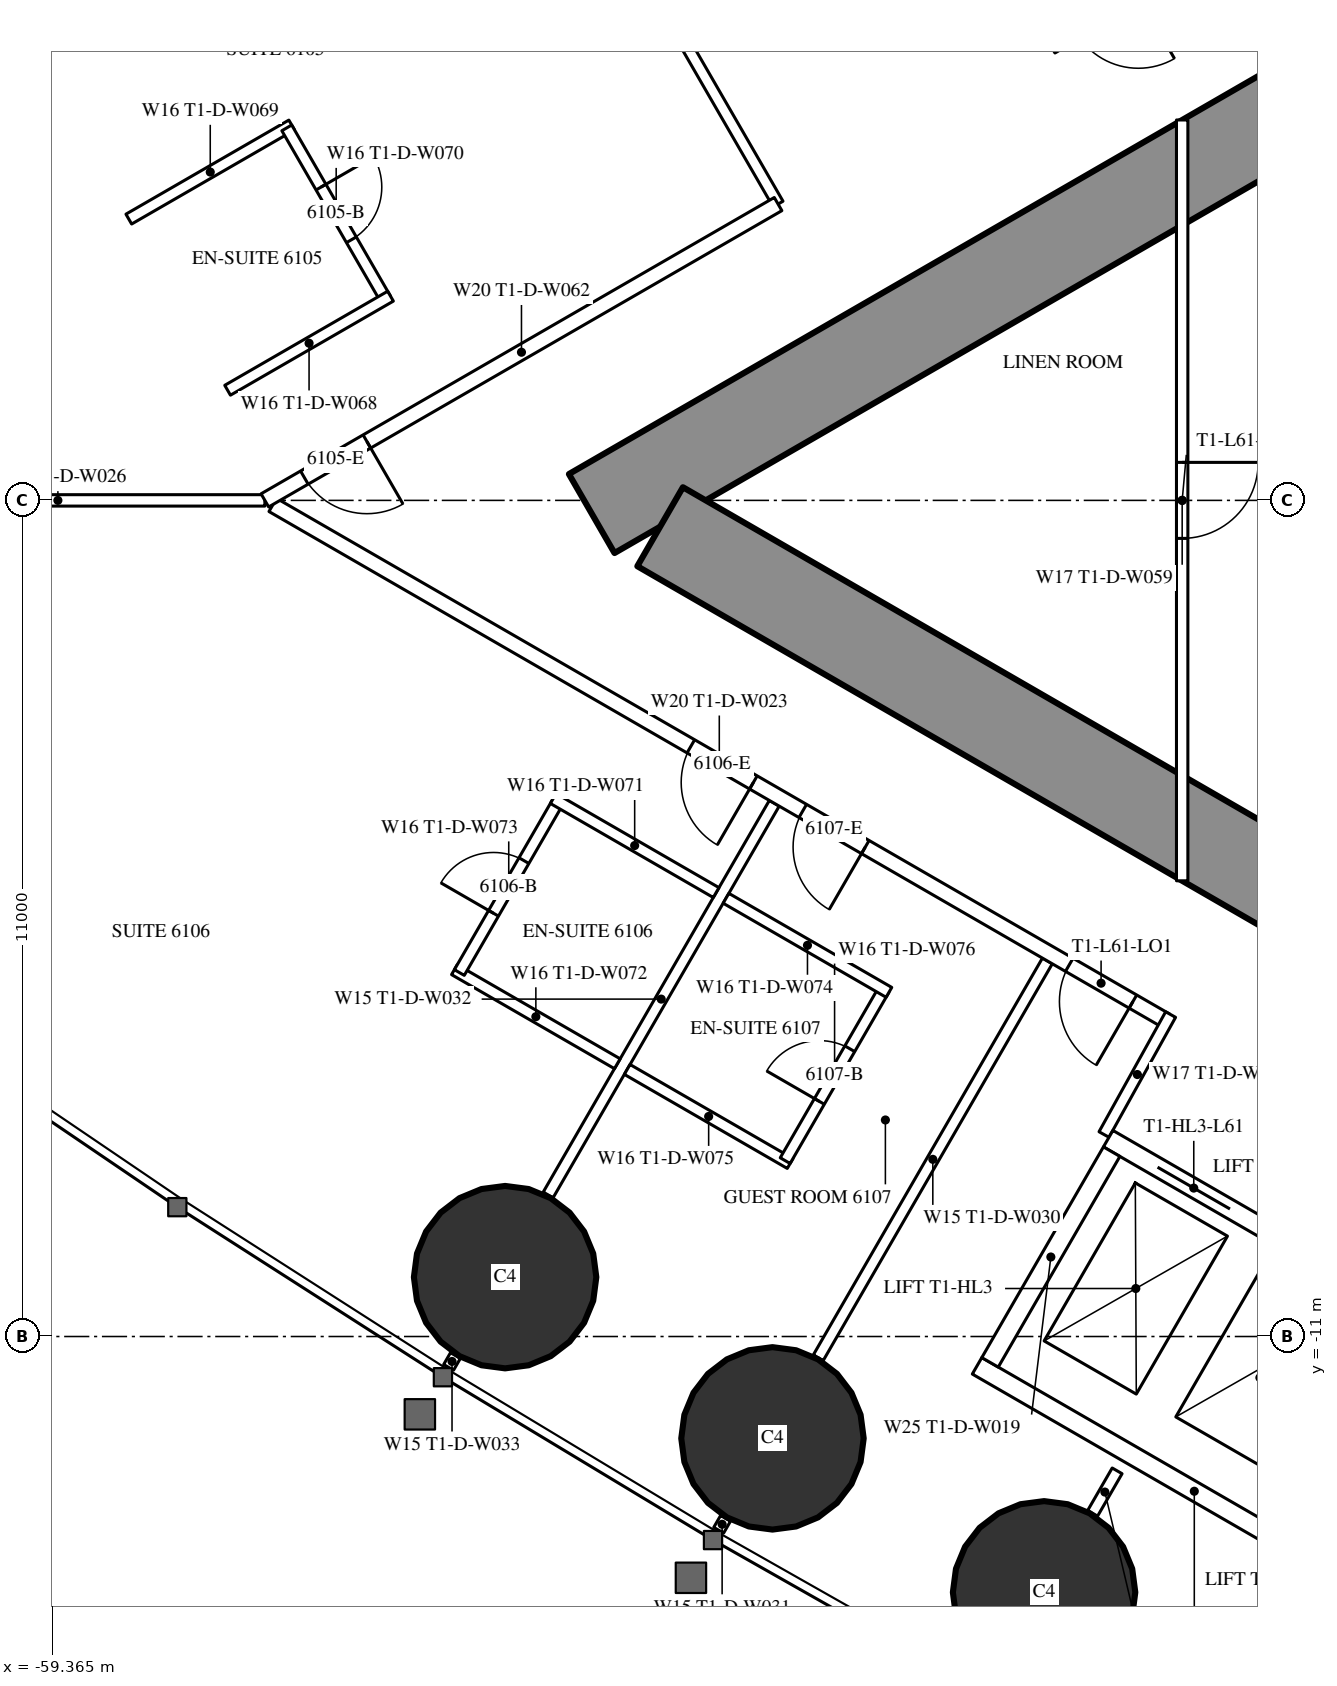
"""IFC4 building model, lengths in metres.
Left out: names, types, materials, properties, quantities, classifications, styles, units other than length and angle.
Written with IfcOpenShell. Run it as: python <this file> out.ifc"""

import sys

from ifc_helpers import new_model, si_unit, direction, frame, frame_2d, origin, origin_2d, place, context, subcontext, project, spatial, rectangle, circle, extrude, element, fill, save


model = new_model("IFC4")
c1 = context("Model", 3, precision=1e-05, world=origin(), true_north=direction((0.0, 1.0)))
c2 = subcontext(c1, "Body", "Model", "MODEL_VIEW")
j1 = project(units=[si_unit("LENGTHUNIT", "METRE"), si_unit("PLANEANGLEUNIT", "RADIAN")], contexts=[c1])
p1 = place(None, origin())
s1 = spatial("IfcSite", under=j1, at=p1, CompositionType="ELEMENT")
p2 = place(p1, origin())
s2 = spatial("IfcBuilding", under=s1, at=p2, CompositionType="ELEMENT")
p3 = place(p2, frame((0.0, 0.0, 229.7)))
s3 = spatial("IfcBuildingStorey", under=s2, at=p3, CompositionType="ELEMENT", Elevation=229.7)
for number, where, z_axis, x_axis in (
    (1, (-53.408, -10.219, 0.0), (0.0, 0.0, 1.0), (1.0, 0.0, 0.0)),
    (2, (-49.89, -12.34, 0.0), (0.0, 0.0, 1.0), (1.0, 0.0, 0.0)),
    (3, (-46.317, -14.365, 0.0), (0.0, 0.0, 1.0), (1.0, 0.0, 0.0)),
):
    element("IfcColumn", number, at=place(p3, frame(where, z_axis=z_axis, x_axis=x_axis)), inside=s3, PredefinedType="COLUMN", context=c2, shape_type="SweptSolid", body=[
        extrude(circle(Radius=1.2, at=origin_2d()), origin(), (0.0, 0.0, 1.0), 3.6),
    ])
p4 = place(p3, frame((-27.2, 14.3, 0.0), z_axis=(0.0, 0.0, 1.0), x_axis=(-0.866026593062, -0.499997940104, 0.0)))
e4 = element("IfcWall", 4, at=p4, inside=s3, PredefinedType="SHEAR", context=c2, shape_type="SweptSolid", body=[
    extrude(rectangle(XDim=28.946, YDim=1.2, at=frame_2d((14.473, 0.0))), origin(), (0.0, 0.0, 1.0), 3.6),
])
p5 = place(p4, frame((4.6, 0.0, 0.0)))
e5 = element("IfcOpeningElement", 5, at=p5, cuts=e4, PredefinedType="OPENING", context=c2, shape_type="SweptSolid", body=[
    extrude(rectangle(XDim=1.0, YDim=2.2, at=frame_2d((0.5, 1.1))), frame((0.0, 0.61, 0.0), z_axis=(0.0, -1.0, 0.0), x_axis=(1.0, 0.0, 0.0)), (0.0, 0.0, 1.0), 1.22),
])
p6 = place(p4, frame((13.395, 0.0, 0.0)))
e6 = element("IfcOpeningElement", 6, at=p6, cuts=e4, PredefinedType="OPENING", context=c2, shape_type="SweptSolid", body=[
    extrude(rectangle(XDim=1.8, YDim=2.2, at=frame_2d((0.9, 1.1))), frame((0.0, 0.61, 0.0), z_axis=(0.0, -1.0, 0.0), x_axis=(1.0, 0.0, 0.0)), (0.0, 0.0, 1.0), 1.22),
])
p7 = place(p3, frame((-27.2, -14.3, 0.0), z_axis=(0.0, 0.0, 1.0), x_axis=(-0.866024021859, 0.500002393557, 0.0)))
e7 = element("IfcWall", 7, at=p7, inside=s3, PredefinedType="SHEAR", context=c2, shape_type="SweptSolid", body=[
    extrude(rectangle(XDim=27.907, YDim=1.2, at=frame_2d((13.954, 0.0))), origin(), (0.0, 0.0, 1.0), 3.6),
])
p8 = place(p7, frame((4.6, 0.0, 0.0)))
e8 = element("IfcOpeningElement", 8, at=p8, cuts=e7, PredefinedType="OPENING", context=c2, shape_type="SweptSolid", body=[
    extrude(rectangle(XDim=1.0, YDim=2.2, at=frame_2d((0.5, 1.1))), frame((0.0, 0.61, 0.0), z_axis=(0.0, -1.0, 0.0), x_axis=(1.0, 0.0, 0.0)), (0.0, 0.0, 1.0), 1.22),
])
p9 = place(p7, frame((13.395, 0.0, 0.0)))
e9 = element("IfcOpeningElement", 9, at=p9, cuts=e7, PredefinedType="OPENING", context=c2, shape_type="SweptSolid", body=[
    extrude(rectangle(XDim=1.8, YDim=2.2, at=frame_2d((0.9, 1.1))), frame((0.0, 0.61, 0.0), z_axis=(0.0, -1.0, 0.0), x_axis=(1.0, 0.0, 0.0)), (0.0, 0.0, 1.0), 1.22),
])
p10 = place(p3, frame((-49.816, 3.898, 0.0), z_axis=(0.0, 0.0, 1.0), x_axis=(-0.500001913541, 0.866024298998, 0.0)))
e10 = element("IfcWall", 10, at=p10, inside=s3, PredefinedType="PARTITIONING", context=c2, shape_type="SweptSolid", body=[
    extrude(rectangle(XDim=6.05, YDim=0.15, at=frame_2d((3.025, 0.0))), origin(), (0.0, 0.0, 1.0), 2.45),
])
p11 = place(p3, frame((-46.274, -6.059, 0.0), z_axis=(0.0, 0.0, 1.0), x_axis=(-0.500020471368, -0.866013584312, 0.0)))
e11 = element("IfcWall", 11, at=p11, inside=s3, PredefinedType="PARTITIONING", context=c2, shape_type="SweptSolid", body=[
    extrude(rectangle(XDim=6.028, YDim=0.15, at=frame_2d((3.014, 0.0))), origin(), (0.0, 0.0, 1.0), 2.45),
])
p12 = place(p3, frame((-50.508, -13.392, 0.0), z_axis=(0.0, 0.0, 1.0), x_axis=(-0.499644091975, -0.866230789891, 0.0)))
e12 = element("IfcWall", 12, at=p12, inside=s3, PredefinedType="PARTITIONING", context=c2, shape_type="SweptSolid", body=[
    extrude(rectangle(XDim=0.18, YDim=0.15, at=frame_2d((0.09, 0.0))), origin(), (0.0, 0.0, 1.0), 2.45),
])
p13 = place(p3, frame((-49.866, -3.985, 0.0), z_axis=(0.0, 0.0, 1.0), x_axis=(-0.500000694566, -0.866025002776, 0.0)))
e13 = element("IfcWall", 13, at=p13, inside=s3, PredefinedType="PARTITIONING", context=c2, shape_type="SweptSolid", body=[
    extrude(rectangle(XDim=5.95, YDim=0.15, at=frame_2d((2.975, 0.0))), origin(), (0.0, 0.0, 1.0), 2.45),
])
p14 = place(p3, frame((-54.061, -11.25, 0.0), z_axis=(0.0, 0.0, 1.0), x_axis=(-0.500391173478, -0.865799441849, 0.0)))
e14 = element("IfcWall", 14, at=p14, inside=s3, PredefinedType="PARTITIONING", context=c2, shape_type="SweptSolid", body=[
    extrude(rectangle(XDim=0.179, YDim=0.15, at=frame_2d((0.089, 0.0))), origin(), (0.0, 0.0, 1.0), 2.45),
])
p15 = place(p3, frame((-56.568, 0.0, 0.0), z_axis=(0.0, 0.0, 1.0), x_axis=(-1.0, 0.0, 0.0)))
e15 = element("IfcWall", 15, at=p15, inside=s3, PredefinedType="PARTITIONING", context=c2, shape_type="SweptSolid", body=[
    extrude(rectangle(XDim=5.446, YDim=0.15, at=frame_2d((2.723, 0.0))), origin(), (0.0, 0.0, 1.0), 2.45),
])
p16 = place(p3, frame((-45.356, -12.767, 0.0), z_axis=(0.0, 0.0, 1.0), x_axis=(-0.499886366516, -0.866091000168, 0.0)))
e16 = element("IfcWall", 16, at=p16, inside=s3, PredefinedType="PARTITIONING", context=c2, shape_type="SweptSolid", body=[
    extrude(rectangle(XDim=0.645, YDim=0.15, at=frame_2d((0.322, 0.0))), origin(), (0.0, 0.0, 1.0), 3.35),
])
p17 = place(p3, frame((-44.715, -6.844, 0.0), z_axis=(0.0, 0.0, 1.0), x_axis=(-0.866025261224, 0.500000246922, 0.0)))
e17 = element("IfcWall", 17, at=p17, inside=s3, PredefinedType="PARTITIONING", context=c2, shape_type="SweptSolid", body=[
    extrude(rectangle(XDim=13.567, YDim=0.2, at=frame_2d((6.783, 0.0))), origin(), (0.0, 0.0, 1.0), 3.35),
])
p18 = place(p17, frame((6.266, 0.0, 0.0)))
e18 = element("IfcOpeningElement", 18, at=p18, cuts=e17, PredefinedType="OPENING", context=c2, shape_type="SweptSolid", body=[
    extrude(rectangle(XDim=0.95, YDim=2.2, at=frame_2d((0.475, 1.1))), frame((0.0, 0.11, 0.0), z_axis=(0.0, -1.0, 0.0), x_axis=(1.0, 0.0, 0.0)), (0.0, 0.0, 1.0), 0.22),
])
p19 = place(p17, frame((4.565, 0.0, 0.0)))
e19 = element("IfcOpeningElement", 19, at=p19, cuts=e17, PredefinedType="OPENING", context=c2, shape_type="SweptSolid", body=[
    extrude(rectangle(XDim=0.95, YDim=2.2, at=frame_2d((0.475, 1.1))), frame((0.0, 0.11, 0.0), z_axis=(0.0, -1.0, 0.0), x_axis=(1.0, 0.0, 0.0)), (0.0, 0.0, 1.0), 0.22),
])
p20 = place(p17, frame((0.5, 0.0, 0.0)))
e20 = element("IfcOpeningElement", 20, at=p20, cuts=e17, PredefinedType="OPENING", context=c2, shape_type="SweptSolid", body=[
    extrude(rectangle(XDim=0.967, YDim=2.2, at=frame_2d((0.483, 1.1))), frame((0.0, 0.11, 0.0), z_axis=(0.0, -1.0, 0.0), x_axis=(1.0, 0.0, 0.0)), (0.0, 0.0, 1.0), 0.22),
])
p21 = place(p3, frame((-44.652, -6.764, 0.0), z_axis=(0.0, 0.0, 1.0), x_axis=(-0.485424724123, -0.874278466629, 0.0)))
e21 = element("IfcWall", 21, at=p21, inside=s3, PredefinedType="PARTITIONING", context=c2, shape_type="SweptSolid", body=[
    extrude(rectangle(XDim=1.805, YDim=0.15, at=frame_2d((0.903, 0.0))), origin(), (0.0, 0.0, 1.0), 3.35),
])
p22 = place(p3, frame((-56.215, 4.938, 0.0), z_axis=(0.0, 0.0, 1.0), x_axis=(-0.866006523861, -0.500032699561, 0.0)))
e22 = element("IfcWall", 22, at=p22, inside=s3, PredefinedType="PARTITIONING", context=c2, shape_type="SweptSolid", body=[
    extrude(rectangle(XDim=2.475, YDim=0.15, at=frame_2d((1.237, 0.0))), origin(), (0.0, 0.0, 1.0), 3.35),
])
p23 = place(p3, frame((-54.98, 2.649, 0.0), z_axis=(0.0, 0.0, 1.0), x_axis=(-0.500006934395, 0.866021400173, 0.0)))
e23 = element("IfcWall", 23, at=p23, inside=s3, PredefinedType="PARTITIONING", context=c2, shape_type="SweptSolid", body=[
    extrude(rectangle(XDim=2.6, YDim=0.15, at=frame_2d((1.3, 0.0))), origin(), (0.0, 0.0, 1.0), 3.35),
])
p24 = place(p23, frame((0.9, 0.0, 0.0)))
e24 = element("IfcOpeningElement", 24, at=p24, cuts=e23, PredefinedType="OPENING", context=c2, shape_type="SweptSolid", body=[
    extrude(rectangle(XDim=0.8, YDim=2.2, at=frame_2d((0.4, 1.1))), frame((0.0, 0.085, 0.0), z_axis=(0.0, -1.0, 0.0), x_axis=(1.0, 0.0, 0.0)), (0.0, 0.0, 1.0), 0.17),
])
for number, where, z_axis, x_axis in (
    (25, (-54.915, 2.687, 0.0), (0.0, 0.0, 1.0), (-0.866, -0.5, 0.0)),
    (26, (-51.931, -7.411, 0.0), (0.0, 0.0, 1.0), (-0.866, 0.5, 0.0)),
):
    element("IfcWall", number, at=place(p3, frame(where, z_axis=z_axis, x_axis=x_axis)), inside=s3, PredefinedType="PARTITIONING", context=c2, shape_type="SweptSolid", body=[
        extrude(rectangle(XDim=2.475, YDim=0.15, at=frame_2d((1.237, 0.0))), origin(), (0.0, 0.0, 1.0), 3.35),
    ])
p25 = place(p3, frame((-52.71, -3.96, 0.0), z_axis=(0.0, 0.0, 1.0), x_axis=(-0.500006934395, -0.866021400173, 0.0)))
e27 = element("IfcWall", 27, at=p25, inside=s3, PredefinedType="PARTITIONING", context=c2, shape_type="SweptSolid", body=[
    extrude(rectangle(XDim=2.6, YDim=0.15, at=frame_2d((1.3, 0.0))), origin(), (0.0, 0.0, 1.0), 3.35),
])
p26 = place(p25, frame((0.9, 0.0, 0.0)))
e28 = element("IfcOpeningElement", 28, at=p26, cuts=e27, PredefinedType="OPENING", context=c2, shape_type="SweptSolid", body=[
    extrude(rectangle(XDim=0.8, YDim=2.2, at=frame_2d((0.4, 1.1))), frame((0.0, 0.085, 0.0), z_axis=(0.0, -1.0, 0.0), x_axis=(1.0, 0.0, 0.0)), (0.0, 0.0, 1.0), 0.17),
])
p27 = place(p3, frame((-50.631, -5.16, 0.0), z_axis=(0.0, 0.0, 1.0), x_axis=(-0.86604923931, 0.499958713387, 0.0)))
e29 = element("IfcWall", 29, at=p27, inside=s3, PredefinedType="PARTITIONING", context=c2, shape_type="SweptSolid", body=[
    extrude(rectangle(XDim=2.475, YDim=0.15, at=frame_2d((1.237, 0.0))), origin(), (0.0, 0.0, 1.0), 2.5),
])
p28 = place(p3, frame((-49.658, -8.724, 0.0), z_axis=(0.0, 0.0, 1.0), x_axis=(-0.866031185235, 0.4999899861, 0.0)))
e30 = element("IfcWall", 30, at=p28, inside=s3, PredefinedType="PARTITIONING", context=c2, shape_type="SweptSolid", body=[
    extrude(rectangle(XDim=2.475, YDim=0.15, at=frame_2d((1.238, 0.0))), origin(), (0.0, 0.0, 1.0), 3.35),
])
p29 = place(p3, frame((-48.423, -6.435, 0.0), z_axis=(0.0, 0.0, 1.0), x_axis=(-0.500006934395, -0.866021400173, 0.0)))
e31 = element("IfcWall", 31, at=p29, inside=s3, PredefinedType="PARTITIONING", context=c2, shape_type="SweptSolid", body=[
    extrude(rectangle(XDim=2.6, YDim=0.15, at=frame_2d((1.3, 0.0))), origin(), (0.0, 0.0, 1.0), 3.35),
])
p30 = place(p29, frame((0.9, 0.0, 0.0)))
e32 = element("IfcOpeningElement", 32, at=p30, cuts=e31, PredefinedType="OPENING", context=c2, shape_type="SweptSolid", body=[
    extrude(rectangle(XDim=0.8, YDim=2.2, at=frame_2d((0.4, 1.1))), frame((0.0, 0.085, 0.0), z_axis=(0.0, -1.0, 0.0), x_axis=(1.0, 0.0, 0.0)), (0.0, 0.0, 1.0), 0.17),
])
p31 = place(p3, frame((-48.358, -6.472, 0.0), z_axis=(0.0, 0.0, 1.0), x_axis=(-0.866073894602, 0.499916002032, 0.0)))
e33 = element("IfcWall", 33, at=p31, inside=s3, PredefinedType="PARTITIONING", context=c2, shape_type="SweptSolid", body=[
    extrude(rectangle(XDim=2.475, YDim=0.15, at=frame_2d((1.238, 0.0))), origin(), (0.0, 0.0, 1.0), 2.5),
])
p32 = place(p3, frame((-28.737, 16.068, 0.0), z_axis=(0.0, 0.0, 1.0), x_axis=(-0.866023901326, -0.500002602325, 0.0)))
e34 = element("IfcWall", 34, at=p32, inside=s3, PredefinedType="PARTITIONING", context=c2, shape_type="SweptSolid", body=[
    extrude(rectangle(XDim=20.192, YDim=0.2, at=frame_2d((10.096, 0.0))), origin(), (0.0, 0.0, 1.0), 3.35),
])
p33 = place(p32, frame((1.08, 0.0, 0.0)))
e35 = element("IfcOpeningElement", 35, at=p33, cuts=e34, PredefinedType="OPENING", context=c2, shape_type="SweptSolid", body=[
    extrude(rectangle(XDim=1.8, YDim=2.04, at=frame_2d((0.9, 1.02))), frame((0.0, 0.11, 0.0), z_axis=(0.0, -1.0, 0.0), x_axis=(1.0, 0.0, 0.0)), (0.0, 0.0, 1.0), 0.22),
])
p34 = place(p32, frame((6.86, 0.0, 0.0)))
e36 = element("IfcOpeningElement", 36, at=p34, cuts=e34, PredefinedType="OPENING", context=c2, shape_type="SweptSolid", body=[
    extrude(rectangle(XDim=1.0, YDim=2.2, at=frame_2d((0.5, 1.1))), frame((0.0, 0.11, 0.0), z_axis=(0.0, -1.0, 0.0), x_axis=(1.0, 0.0, 0.0)), (0.0, 0.0, 1.0), 0.22),
])
p35 = place(p32, frame((18.867, 0.0, 0.0)))
e37 = element("IfcOpeningElement", 37, at=p35, cuts=e34, PredefinedType="OPENING", context=c2, shape_type="SweptSolid", body=[
    extrude(rectangle(XDim=0.95, YDim=2.2, at=frame_2d((0.475, 1.1))), frame((0.0, 0.11, 0.0), z_axis=(0.0, -1.0, 0.0), x_axis=(1.0, 0.0, 0.0)), (0.0, 0.0, 1.0), 0.22),
])
p36 = place(p3, frame((-49.816, 3.898, 0.0), z_axis=(0.0, 0.0, 1.0), x_axis=(-0.866028102716, -0.499995325284, 0.0)))
e38 = element("IfcWall", 38, at=p36, inside=s3, PredefinedType="PARTITIONING", context=c2, shape_type="SweptSolid", body=[
    extrude(rectangle(XDim=7.796, YDim=0.2, at=frame_2d((3.898, 0.0))), origin(), (0.0, 0.0, 1.0), 3.35),
])
p37 = place(p36, frame((6.246, 0.0, 0.0)))
e39 = element("IfcOpeningElement", 39, at=p37, cuts=e38, PredefinedType="OPENING", context=c2, shape_type="SweptSolid", body=[
    extrude(rectangle(XDim=0.95, YDim=2.2, at=frame_2d((0.475, 1.1))), frame((0.0, 0.11, 0.0), z_axis=(0.0, -1.0, 0.0), x_axis=(1.0, 0.0, 0.0)), (0.0, 0.0, 1.0), 0.22),
])
p38 = place(p3, frame((-44.5, 5.005, 0.0), z_axis=(0.0, 0.0, 1.0), x_axis=(0.0, -1.0, 0.0)))
e40 = element("IfcWall", 40, at=p38, inside=s3, PredefinedType="PARTITIONING", context=c2, shape_type="SweptSolid", body=[
    extrude(rectangle(XDim=10.009, YDim=0.15, at=frame_2d((5.005, 0.0))), origin(), (0.0, 0.0, 1.0), 2.5),
])
p39 = place(p38, frame((4.505, 0.0, 0.0)))
e41 = element("IfcOpeningElement", 41, at=p39, cuts=e40, PredefinedType="OPENING", context=c2, shape_type="SweptSolid", body=[
    extrude(rectangle(XDim=1.0, YDim=2.2, at=frame_2d((0.5, 1.1))), frame((0.0, 0.085, 0.0), z_axis=(0.0, -1.0, 0.0), x_axis=(1.0, 0.0, 0.0)), (0.0, 0.0, 1.0), 0.17),
])
p40 = place(p3, frame((-39.758, -11.697, 0.0), z_axis=(0.0, 0.0, 1.0), x_axis=(-0.866024194504, 0.500002094529, 0.0)))
e42 = element("IfcWall", 42, at=p40, inside=s3, PredefinedType="PARTITIONING", context=c2, shape_type="SweptSolid", body=[
    extrude(rectangle(XDim=6.6, YDim=0.25, at=frame_2d((3.3, 0.0))), origin(), (0.0, 0.0, 1.0), 3.35),
])
p41 = place(p40, frame((0.75, 0.0, 0.0)))
e43 = element("IfcOpeningElement", 43, at=p41, cuts=e42, PredefinedType="OPENING", context=c2, shape_type="SweptSolid", body=[
    extrude(rectangle(XDim=1.1, YDim=2.2, at=frame_2d((0.55, 1.1))), frame((0.0, 0.135, 0.0), z_axis=(0.0, -1.0, 0.0), x_axis=(1.0, 0.0, 0.0)), (0.0, 0.0, 1.0), 0.27),
])
p42 = place(p40, frame((2.75, 0.0, 0.0)))
e44 = element("IfcOpeningElement", 44, at=p42, cuts=e42, PredefinedType="OPENING", context=c2, shape_type="SweptSolid", body=[
    extrude(rectangle(XDim=1.1, YDim=2.2, at=frame_2d((0.55, 1.1))), frame((0.0, 0.135, 0.0), z_axis=(0.0, -1.0, 0.0), x_axis=(1.0, 0.0, 0.0)), (0.0, 0.0, 1.0), 0.27),
])
p43 = place(p40, frame((4.75, 0.0, 0.0)))
e45 = element("IfcOpeningElement", 45, at=p43, cuts=e42, PredefinedType="OPENING", context=c2, shape_type="SweptSolid", body=[
    extrude(rectangle(XDim=1.1, YDim=2.2, at=frame_2d((0.55, 1.1))), frame((0.0, 0.135, 0.0), z_axis=(0.0, -1.0, 0.0), x_axis=(1.0, 0.0, 0.0)), (0.0, 0.0, 1.0), 0.27),
])
p44 = place(p3, frame((-41.482, -14.686, 0.0), z_axis=(0.0, 0.0, 1.0), x_axis=(-0.86603344179, 0.499986077507, 0.0)))
e46 = element("IfcWall", 46, at=p44, inside=s3, PredefinedType="PARTITIONING", context=c2, shape_type="SweptSolid", body=[
    extrude(rectangle(XDim=6.6, YDim=0.25, at=frame_2d((3.3, 0.0))), origin(), (0.0, 0.0, 1.0), 3.35),
])
p45 = place(p3, frame((-45.428, -8.568, 0.0), z_axis=(0.0, 0.0, 1.0), x_axis=(-0.499929347863, -0.866066190972, 0.0)))
e47 = element("IfcWall", 47, at=p45, inside=s3, PredefinedType="PARTITIONING", context=c2, shape_type="SweptSolid", body=[
    extrude(rectangle(XDim=3.201, YDim=0.25, at=frame_2d((1.6, 0.0))), origin(), (0.0, 0.0, 1.0), 3.35),
])
p46 = place(p24, origin())
e48 = element("IfcDoor", 48, at=p46, inside=s3, OperationType="SINGLE_SWING_RIGHT", PredefinedType="DOOR", context=c2, shape_type="SweptSolid", body=[
    extrude(rectangle(XDim=0.8, YDim=2.2, at=frame_2d((0.4, 1.1))), frame((0.0, 0.025, 0.0), z_axis=(0.0, -1.0, 0.0), x_axis=(1.0, 0.0, 0.0)), (0.0, 0.0, 1.0), 0.05),
])
fill(e24, e48)
p47 = place(p37, origin())
e49 = element("IfcDoor", 49, at=p47, inside=s3, OperationType="SINGLE_SWING_LEFT", PredefinedType="DOOR", context=c2, shape_type="SweptSolid", body=[
    extrude(rectangle(XDim=0.95, YDim=2.2, at=frame_2d((0.475, 1.1))), frame((0.0, 0.025, 0.0), z_axis=(0.0, -1.0, 0.0), x_axis=(1.0, 0.0, 0.0)), (0.0, 0.0, 1.0), 0.05),
])
fill(e39, e49)
p48 = place(p26, origin())
e50 = element("IfcDoor", 50, at=p48, inside=s3, OperationType="SINGLE_SWING_RIGHT", PredefinedType="DOOR", context=c2, shape_type="SweptSolid", body=[
    extrude(rectangle(XDim=0.8, YDim=2.2, at=frame_2d((0.4, 1.1))), frame((0.0, 0.025, 0.0), z_axis=(0.0, -1.0, 0.0), x_axis=(1.0, 0.0, 0.0)), (0.0, 0.0, 1.0), 0.05),
])
fill(e28, e50)
p49 = place(p18, origin())
e51 = element("IfcDoor", 51, at=p49, inside=s3, OperationType="SINGLE_SWING_LEFT", PredefinedType="DOOR", context=c2, shape_type="SweptSolid", body=[
    extrude(rectangle(XDim=0.95, YDim=2.2, at=frame_2d((0.475, 1.1))), frame((0.0, 0.025, 0.0), z_axis=(0.0, -1.0, 0.0), x_axis=(1.0, 0.0, 0.0)), (0.0, 0.0, 1.0), 0.05),
])
fill(e18, e51)
p50 = place(p30, origin())
e52 = element("IfcDoor", 52, at=p50, inside=s3, OperationType="SINGLE_SWING_RIGHT", PredefinedType="DOOR", context=c2, shape_type="SweptSolid", body=[
    extrude(rectangle(XDim=0.8, YDim=2.2, at=frame_2d((0.4, 1.1))), frame((0.0, 0.025, 0.0), z_axis=(0.0, -1.0, 0.0), x_axis=(1.0, 0.0, 0.0)), (0.0, 0.0, 1.0), 0.05),
])
fill(e32, e52)
p51 = place(p19, origin())
e53 = element("IfcDoor", 53, at=p51, inside=s3, OperationType="SINGLE_SWING_LEFT", PredefinedType="DOOR", context=c2, shape_type="SweptSolid", body=[
    extrude(rectangle(XDim=0.95, YDim=2.2, at=frame_2d((0.475, 1.1))), frame((0.0, 0.025, 0.0), z_axis=(0.0, -1.0, 0.0), x_axis=(1.0, 0.0, 0.0)), (0.0, 0.0, 1.0), 0.05),
])
fill(e19, e53)
p52 = place(p20, origin())
e54 = element("IfcDoor", 54, at=p52, inside=s3, OperationType="SINGLE_SWING_LEFT", PredefinedType="DOOR", context=c2, shape_type="SweptSolid", body=[
    extrude(rectangle(XDim=0.967, YDim=2.2, at=frame_2d((0.483, 1.1))), frame((0.0, 0.025, 0.0), z_axis=(0.0, -1.0, 0.0), x_axis=(1.0, 0.0, 0.0)), (0.0, 0.0, 1.0), 0.05),
])
fill(e20, e54)
p53 = place(p39, origin())
e55 = element("IfcDoor", 55, at=p53, inside=s3, OperationType="SINGLE_SWING_LEFT", PredefinedType="DOOR", context=c2, shape_type="SweptSolid", body=[
    extrude(rectangle(XDim=1.0, YDim=2.2, at=frame_2d((0.5, 1.1))), frame((0.0, 0.025, 0.0), z_axis=(0.0, -1.0, 0.0), x_axis=(1.0, 0.0, 0.0)), (0.0, 0.0, 1.0), 0.05),
])
fill(e41, e55)
p54 = place(p43, origin())
e56 = element("IfcDoor", 56, at=p54, inside=s3, OperationType="DOUBLE_DOOR_SLIDING", PredefinedType="USERDEFINED", context=c2, shape_type="SweptSolid", body=[
    extrude(rectangle(XDim=1.1, YDim=2.2, at=frame_2d((0.55, 1.1))), frame((0.0, 0.025, 0.0), z_axis=(0.0, -1.0, 0.0), x_axis=(1.0, 0.0, 0.0)), (0.0, 0.0, 1.0), 0.05),
])
fill(e45, e56)
save(model, sys.argv[1])
